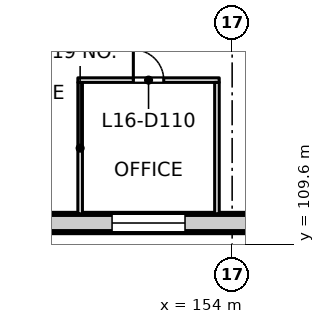
"""IFC4 building model, lengths in metres.
Left out: names, types, materials, properties, quantities, classifications, styles, units other than length and angle.
Written with IfcOpenShell. Run it as: python <this file> out.ifc"""

import sys

from ifc_helpers import new_model, si_unit, direction, frame, frame_2d, origin, place, context, subcontext, project, spatial, rectangle, extrude, element, fill, save


model = new_model("IFC4")
c1 = context("Model", 3, precision=1e-05, world=origin(), true_north=direction((0.0, 1.0)))
c2 = subcontext(c1, "Body", "Model", "MODEL_VIEW")
j1 = project(units=[si_unit("LENGTHUNIT", "METRE"), si_unit("PLANEANGLEUNIT", "RADIAN")], contexts=[c1])
p1 = place(None, origin())
s1 = spatial("IfcSite", under=j1, at=p1, CompositionType="ELEMENT")
p2 = place(p1, origin())
s2 = spatial("IfcBuilding", under=s1, at=p2, CompositionType="ELEMENT")
p3 = place(p2, frame((0.0, 0.0, 71.5)))
s3 = spatial("IfcBuildingStorey", under=s2, at=p3, CompositionType="ELEMENT", Elevation=71.5)
p4 = place(p3, frame((162.93, 110.3, 0.0), z_axis=(0.0, 0.0, 1.0), x_axis=(-1.0, 0.0, 0.0)))
e1 = element("IfcWall", 1, at=p4, inside=s3, PredefinedType="SOLIDWALL", context=c2, shape_type="SweptSolid", body=[
    extrude(rectangle(XDim=31.93, YDim=0.6, at=frame_2d((15.965, 0.0))), origin(), (0.0, 0.0, 1.0), 3.625),
])
p5 = place(p4, frame((1.48, 0.0, 0.9)))
e2 = element("IfcOpeningElement", 2, at=p5, cuts=e1, PredefinedType="OPENING", context=c2, shape_type="SweptSolid", body=[
    extrude(rectangle(XDim=2.4, YDim=2.4, at=frame_2d((1.2, 1.2))), frame((0.0, 0.31, 0.0), z_axis=(0.0, -1.0, 0.0), x_axis=(1.0, 0.0, 0.0)), (0.0, 0.0, 1.0), 0.62),
])
p6 = place(p4, frame((5.98, 0.0, 0.9)))
e3 = element("IfcOpeningElement", 3, at=p6, cuts=e1, PredefinedType="OPENING", context=c2, shape_type="SweptSolid", body=[
    extrude(rectangle(XDim=2.4, YDim=2.4, at=frame_2d((1.2, 1.2))), frame((0.0, 0.31, 0.0), z_axis=(0.0, -1.0, 0.0), x_axis=(1.0, 0.0, 0.0)), (0.0, 0.0, 1.0), 0.62),
])
p7 = place(p4, frame((10.48, 0.0, 0.9)))
e4 = element("IfcOpeningElement", 4, at=p7, cuts=e1, PredefinedType="OPENING", context=c2, shape_type="SweptSolid", body=[
    extrude(rectangle(XDim=2.4, YDim=2.4, at=frame_2d((1.2, 1.2))), frame((0.0, 0.31, 0.0), z_axis=(0.0, -1.0, 0.0), x_axis=(1.0, 0.0, 0.0)), (0.0, 0.0, 1.0), 0.62),
])
p8 = place(p4, frame((14.98, 0.0, 0.9)))
e5 = element("IfcOpeningElement", 5, at=p8, cuts=e1, PredefinedType="OPENING", context=c2, shape_type="SweptSolid", body=[
    extrude(rectangle(XDim=2.4, YDim=2.4, at=frame_2d((1.2, 1.2))), frame((0.0, 0.31, 0.0), z_axis=(0.0, -1.0, 0.0), x_axis=(1.0, 0.0, 0.0)), (0.0, 0.0, 1.0), 0.62),
])
p9 = place(p4, frame((19.48, 0.0, 0.9)))
e6 = element("IfcOpeningElement", 6, at=p9, cuts=e1, PredefinedType="OPENING", context=c2, shape_type="SweptSolid", body=[
    extrude(rectangle(XDim=2.4, YDim=2.4, at=frame_2d((1.2, 1.2))), frame((0.0, 0.31, 0.0), z_axis=(0.0, -1.0, 0.0), x_axis=(1.0, 0.0, 0.0)), (0.0, 0.0, 1.0), 0.62),
])
p10 = place(p4, frame((23.98, 0.0, 0.9)))
e7 = element("IfcOpeningElement", 7, at=p10, cuts=e1, PredefinedType="OPENING", context=c2, shape_type="SweptSolid", body=[
    extrude(rectangle(XDim=2.4, YDim=2.4, at=frame_2d((1.2, 1.2))), frame((0.0, 0.31, 0.0), z_axis=(0.0, -1.0, 0.0), x_axis=(1.0, 0.0, 0.0)), (0.0, 0.0, 1.0), 0.62),
])
p11 = place(p4, frame((28.48, 0.0, 0.9)))
e8 = element("IfcOpeningElement", 8, at=p11, cuts=e1, PredefinedType="OPENING", context=c2, shape_type="SweptSolid", body=[
    extrude(rectangle(XDim=2.4, YDim=2.4, at=frame_2d((1.2, 1.2))), frame((0.0, 0.31, 0.0), z_axis=(0.0, -1.0, 0.0), x_axis=(1.0, 0.0, 0.0)), (0.0, 0.0, 1.0), 0.62),
])
p12 = place(p3, frame((149.0, 110.6, 0.0), z_axis=(0.0, 0.0, 1.0), x_axis=(0.0, 1.0, 0.0)))
e9 = element("IfcWall", 9, at=p12, inside=s3, PredefinedType="PARTITIONING", context=c2, shape_type="SweptSolid", body=[
    extrude(rectangle(XDim=4.325, YDim=0.15, at=frame_2d((2.163, 0.0))), origin(), (0.0, 0.0, 1.0), 3.625),
])
p13 = place(p3, frame((148.925, 115.0, 0.0), z_axis=(0.0, 0.0, 1.0), x_axis=(1.0, 0.0, 0.0)))
e10 = element("IfcWall", 10, at=p13, inside=s3, PredefinedType="PARTITIONING", context=c2, shape_type="SweptSolid", body=[
    extrude(rectangle(XDim=4.65, YDim=0.15, at=frame_2d((2.325, 0.0))), origin(), (0.0, 0.0, 1.0), 3.625),
])
p14 = place(p13, frame((1.825, 0.0, 0.0)))
e11 = element("IfcOpeningElement", 11, at=p14, cuts=e10, PredefinedType="OPENING", context=c2, shape_type="SweptSolid", body=[
    extrude(rectangle(XDim=1.0, YDim=2.1, at=frame_2d((0.5, 1.05))), frame((0.0, 0.085, 0.0), z_axis=(0.0, -1.0, 0.0), x_axis=(1.0, 0.0, 0.0)), (0.0, 0.0, 1.0), 0.17),
])
p15 = place(p3, frame((153.5, 114.925, 0.0), z_axis=(0.0, 0.0, 1.0), x_axis=(0.0, -1.0, 0.0)))
e12 = element("IfcWall", 12, at=p15, inside=s3, PredefinedType="PARTITIONING", context=c2, shape_type="SweptSolid", body=[
    extrude(rectangle(XDim=4.325, YDim=0.15, at=frame_2d((2.163, 0.0))), origin(), (0.0, 0.0, 1.0), 3.625),
])
p16 = place(p7, origin())
e13 = element("IfcWindow", 13, at=p16, inside=s3, PartitioningType="SINGLE_PANEL", PredefinedType="WINDOW", context=c2, shape_type="SweptSolid", body=[
    extrude(rectangle(XDim=2.4, YDim=2.4, at=frame_2d((1.2, 1.2))), frame((0.0, 0.03, 0.0), z_axis=(0.0, -1.0, 0.0), x_axis=(1.0, 0.0, 0.0)), (0.0, 0.0, 1.0), 0.06),
])
fill(e4, e13)
p17 = place(p14, origin())
e14 = element("IfcDoor", 14, at=p17, inside=s3, OperationType="SINGLE_SWING_LEFT", PredefinedType="DOOR", context=c2, shape_type="SweptSolid", body=[
    extrude(rectangle(XDim=1.0, YDim=2.1, at=frame_2d((0.5, 1.05))), frame((0.0, 0.025, 0.0), z_axis=(0.0, -1.0, 0.0), x_axis=(1.0, 0.0, 0.0)), (0.0, 0.0, 1.0), 0.05),
])
fill(e11, e14)
save(model, sys.argv[1])
